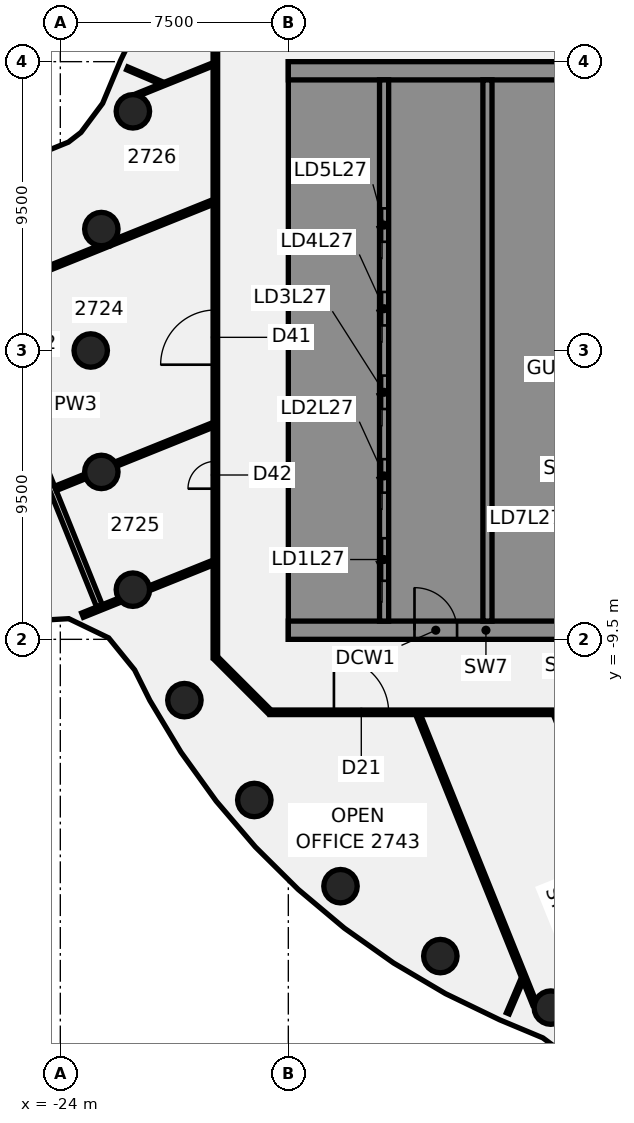
"""IFC4 building model, lengths in metres.
Left out: names, types, materials, properties, quantities, classifications, styles, units other than length and angle.
Written with IfcOpenShell. Run it as: python <this file> out.ifc"""

import sys

from ifc_helpers import new_model, si_unit, direction, frame, frame_2d, origin, origin_2d, place, context, subcontext, project, spatial, polyline, rectangle, circle, outline, extrude, element, fill, save


model = new_model("IFC4")
c1 = context("Model", 3, precision=1e-05, world=origin(), true_north=direction((0.0, 1.0)))
c2 = subcontext(c1, "Body", "Model", "MODEL_VIEW")
j1 = project(units=[si_unit("LENGTHUNIT", "METRE"), si_unit("PLANEANGLEUNIT", "RADIAN")], contexts=[c1])
p1 = place(None, origin())
s1 = spatial("IfcSite", under=j1, at=p1, CompositionType="ELEMENT")
p2 = place(p1, origin())
s2 = spatial("IfcBuilding", under=s1, at=p2, CompositionType="ELEMENT")
p3 = place(p2, frame((0.0, 0.0, 113.5)))
s3 = spatial("IfcBuildingStorey", under=s2, at=p3, CompositionType="ELEMENT", Elevation=113.5)
for number, where, z_axis, x_axis in (
    (1, (-21.613, 7.866, -0.14), (0.0, 0.0, 1.0), (1.0, 0.0, 0.0)),
    (2, (-22.651, 3.994, -0.14), (0.0, 0.0, 1.0), (1.0, 0.0, 0.0)),
    (3, (-23.0, 0.0, -0.14), (0.0, 0.0, 1.0), (1.0, 0.0, 0.0)),
    (4, (-22.651, -3.994, -0.14), (0.0, 0.0, 1.0), (1.0, 0.0, 0.0)),
    (5, (-21.613, -7.866, -0.14), (0.0, 0.0, 1.0), (1.0, 0.0, 0.0)),
    (6, (-19.919, -11.5, -0.14), (0.0, 0.0, 1.0), (1.0, 0.0, 0.0)),
    (7, (-17.619, -14.784, -0.14), (0.0, 0.0, 1.0), (1.0, 0.0, 0.0)),
    (8, (-14.784, -17.619, -0.14), (0.0, 0.0, 1.0), (1.0, 0.0, 0.0)),
    (9, (-11.5, -19.919, -0.14), (0.0, 0.0, 1.0), (1.0, 0.0, 0.0)),
    (10, (-7.866, -21.613, -0.14), (0.0, 0.0, 1.0), (1.0, 0.0, 0.0)),
):
    element("IfcColumn", number, at=place(p3, frame(where, z_axis=z_axis, x_axis=x_axis)), inside=s3, PredefinedType="COLUMN", context=c2, shape_type="SweptSolid", body=[
        extrude(circle(Radius=0.55, at=origin_2d()), origin(), (0.0, 0.0, 1.0), 3.75),
    ])
p4 = place(p3, frame((-28.028, 4.794, 0.0), z_axis=(0.0, 0.0, 1.0), x_axis=(0.373618022446, -0.927582650389, 0.0)))
e11 = element("IfcWall", 11, at=p4, inside=s3, PredefinedType="PARTITIONING", context=c2, shape_type="SweptSolid", body=[
    extrude(rectangle(XDim=14.224, YDim=0.2, at=frame_2d((7.112, 0.0))), origin(), (0.0, 0.0, 1.0), 3.01),
])
p5 = place(p4, frame((6.099, 0.0, 0.0)))
e12 = element("IfcOpeningElement", 12, at=p5, cuts=e11, PredefinedType="OPENING", context=c2, shape_type="SweptSolid", body=[
    extrude(rectangle(XDim=1.4, YDim=2.1, at=frame_2d((0.7, 1.05))), frame((0.0, 0.11, 0.0), z_axis=(0.0, -1.0, 0.0), x_axis=(1.0, 0.0, 0.0)), (0.0, 0.0, 1.0), 0.22),
])
p6 = place(p3, frame((-12.229, -11.983, 0.0), z_axis=(0.0, 0.0, 1.0), x_axis=(0.373679389849, -0.927557930052, 0.0)))
e13 = element("IfcWall", 13, at=p6, inside=s3, PredefinedType="PARTITIONING", context=c2, shape_type="SweptSolid", body=[
    extrude(rectangle(XDim=10.258, YDim=0.15, at=frame_2d((5.129, 0.0))), origin(), (0.0, 0.0, 1.0), 3.01),
])
p7 = place(p3, frame((-7.7, -11.983, 0.0), z_axis=(0.0, 0.0, 1.0), x_axis=(0.373640057319, -0.92757377473, 0.0)))
e14 = element("IfcWall", 14, at=p7, inside=s3, PredefinedType="PARTITIONING", context=c2, shape_type="SweptSolid", body=[
    extrude(rectangle(XDim=11.185, YDim=0.15, at=frame_2d((5.593, 0.0))), origin(), (0.0, 0.0, 1.0), 3.01),
])
p8 = place(p7, frame((3.66, 0.0, 0.0)))
e15 = element("IfcOpeningElement", 15, at=p8, cuts=e14, PredefinedType="OPENING", context=c2, shape_type="SweptSolid", body=[
    extrude(rectangle(XDim=0.9, YDim=2.1, at=frame_2d((0.45, 1.05))), frame((0.0, 0.085, 0.0), z_axis=(0.0, -1.0, 0.0), x_axis=(1.0, 0.0, 0.0)), (0.0, 0.0, 1.0), 0.17),
])
p9 = place(p3, frame((-18.872, -10.128, 0.0), z_axis=(0.0, 0.0, 1.0), x_axis=(0.707106781187, -0.707106781187, 0.0)))
e16 = element("IfcWall", 16, at=p9, inside=s3, PredefinedType="PARTITIONING", context=c2, shape_type="SweptSolid", body=[
    extrude(rectangle(XDim=2.465, YDim=0.15, at=frame_2d((1.232, 0.0))), origin(), (0.0, 0.0, 1.0), 3.01),
])
p10 = place(p3, frame((-21.8, 9.281, 0.0), z_axis=(0.0, 0.0, 1.0), x_axis=(0.919919713951, -0.392106771025, 0.0)))
e17 = element("IfcWall", 17, at=p10, inside=s3, PredefinedType="PARTITIONING", context=c2, shape_type="SweptSolid", body=[
    extrude(rectangle(XDim=1.22, YDim=0.1, at=frame_2d((0.61, 0.0))), origin(), (0.0, 0.0, 1.0), 3.01),
])
p11 = place(p3, frame((-17.1, -11.9, 0.0), z_axis=(0.0, 0.0, 1.0), x_axis=(1.0, 0.0, 0.0)))
e18 = element("IfcWall", 18, at=p11, inside=s3, PredefinedType="PARTITIONING", context=c2, shape_type="SweptSolid", body=[
    extrude(rectangle(XDim=34.165, YDim=0.15, at=frame_2d((17.083, 0.0))), origin(), (0.0, 0.0, 1.0), 3.01),
])
p12 = place(p11, frame((12.066, 0.0, 0.0)))
e19 = element("IfcOpeningElement", 19, at=p12, cuts=e18, PredefinedType="OPENING", context=c2, shape_type="SweptSolid", body=[
    extrude(rectangle(XDim=1.8, YDim=2.1, at=frame_2d((0.9, 1.05))), frame((0.0, 0.085, 0.0), z_axis=(0.0, -1.0, 0.0), x_axis=(1.0, 0.0, 0.0)), (0.0, 0.0, 1.0), 0.17),
])
p13 = place(p11, frame((2.1, 0.0, 0.0)))
e20 = element("IfcOpeningElement", 20, at=p13, cuts=e18, PredefinedType="OPENING", context=c2, shape_type="SweptSolid", body=[
    extrude(rectangle(XDim=1.8, YDim=2.1, at=frame_2d((0.9, 1.05))), frame((0.0, 0.085, 0.0), z_axis=(0.0, -1.0, 0.0), x_axis=(1.0, 0.0, 0.0)), (0.0, 0.0, 1.0), 0.17),
])
p14 = place(p11, frame((26.775, 0.0, 0.0)))
e21 = element("IfcOpeningElement", 21, at=p14, cuts=e18, PredefinedType="OPENING", context=c2, shape_type="SweptSolid", body=[
    extrude(rectangle(XDim=1.8, YDim=2.1, at=frame_2d((0.9, 1.05))), frame((0.0, 0.085, 0.0), z_axis=(0.0, -1.0, 0.0), x_axis=(1.0, 0.0, 0.0)), (0.0, 0.0, 1.0), 0.17),
])
p15 = place(p3, frame((-26.702, 1.771, 0.0), z_axis=(0.0, 0.0, 1.0), x_axis=(0.92759802507, 0.373579849412, 0.0)))
e22 = element("IfcWall", 22, at=p15, inside=s3, PredefinedType="PARTITIONING", context=c2, shape_type="SweptSolid", body=[
    extrude(rectangle(XDim=4.613, YDim=0.15, at=frame_2d((2.306, 0.0))), origin(), (0.0, 0.0, 1.0), 3.01),
])
p16 = place(p15, frame((1.25, 0.0, 0.0)))
e23 = element("IfcOpeningElement", 23, at=p16, cuts=e22, PredefinedType="OPENING", context=c2, shape_type="SweptSolid", body=[
    extrude(rectangle(XDim=0.9, YDim=2.1, at=frame_2d((0.45, 1.05))), frame((0.0, 0.085, 0.0), z_axis=(0.0, -1.0, 0.0), x_axis=(1.0, 0.0, 0.0)), (0.0, 0.0, 1.0), 0.17),
])
p17 = place(p3, frame((-22.359, 3.521, 0.0), z_axis=(0.0, 0.0, 1.0), x_axis=(0.927594907251, 0.373587590855, 0.0)))
e24 = element("IfcWall", 24, at=p17, inside=s3, PredefinedType="PARTITIONING", context=c2, shape_type="SweptSolid", body=[
    extrude(rectangle(XDim=3.639, YDim=0.15, at=frame_2d((1.819, 0.0))), origin(), (0.0, 0.0, 1.0), 3.01),
])
p18 = place(p3, frame((-24.161, -4.537, 0.0), z_axis=(0.0, 0.0, 1.0), x_axis=(0.927557987073, 0.37367924831, 0.0)))
e25 = element("IfcWall", 25, at=p18, inside=s3, PredefinedType="PARTITIONING", context=c2, shape_type="SweptSolid", body=[
    extrude(rectangle(XDim=1.066, YDim=0.15, at=frame_2d((0.533, 0.0))), origin(), (0.0, 0.0, 1.0), 3.01),
])
p19 = place(p3, frame((-22.161, -3.731, 0.0), z_axis=(0.0, 0.0, 1.0), x_axis=(0.927574565159, 0.373638095047, 0.0)))
e26 = element("IfcWall", 26, at=p19, inside=s3, PredefinedType="PARTITIONING", context=c2, shape_type="SweptSolid", body=[
    extrude(rectangle(XDim=3.426, YDim=0.15, at=frame_2d((1.713, 0.0))), origin(), (0.0, 0.0, 1.0), 3.01),
])
p20 = place(p3, frame((-23.27, -8.705, 0.0), z_axis=(0.0, 0.0, 1.0), x_axis=(0.927549297967, 0.37370081595, 0.0)))
e27 = element("IfcWall", 27, at=p20, inside=s3, PredefinedType="PARTITIONING", context=c2, shape_type="SweptSolid", body=[
    extrude(rectangle(XDim=1.33, YDim=0.15, at=frame_2d((0.665, 0.0))), origin(), (0.0, 0.0, 1.0), 3.01),
])
p21 = place(p3, frame((-21.066, -7.817, 0.0), z_axis=(0.0, 0.0, 1.0), x_axis=(0.92758920546, 0.373601747739, 0.0)))
e28 = element("IfcWall", 28, at=p21, inside=s3, PredefinedType="PARTITIONING", context=c2, shape_type="SweptSolid", body=[
    extrude(rectangle(XDim=2.245, YDim=0.15, at=frame_2d((1.123, 0.0))), origin(), (0.0, 0.0, 1.0), 3.01),
])
p22 = place(p3, frame((-21.498, 8.396, 0.0), z_axis=(0.0, 0.0, 1.0), x_axis=(0.927570424406, 0.373648374502, 0.0)))
e29 = element("IfcWall", 29, at=p22, inside=s3, PredefinedType="PARTITIONING", context=c2, shape_type="SweptSolid", body=[
    extrude(rectangle(XDim=2.721, YDim=0.1, at=frame_2d((1.36, 0.0))), origin(), (0.0, 0.0, 1.0), 3.01),
])
p23 = place(p3, frame((-9.281, -21.8, 0.0), z_axis=(0.0, 0.0, 1.0), x_axis=(0.392152757944, 0.919900111119, 0.0)))
e30 = element("IfcWall", 30, at=p23, inside=s3, PredefinedType="PARTITIONING", context=c2, shape_type="SweptSolid", body=[
    extrude(rectangle(XDim=1.185, YDim=0.1, at=frame_2d((0.592, 0.0))), origin(), (0.0, 0.0, 1.0), 3.01),
])
p24 = place(p3, frame((-18.9, -10.1, 0.0), z_axis=(0.0, 0.0, 1.0), x_axis=(0.0, 1.0, 0.0)))
e31 = element("IfcWall", 31, at=p24, inside=s3, PredefinedType="PARTITIONING", context=c2, shape_type="SweptSolid", body=[
    extrude(rectangle(XDim=20.2, YDim=0.15, at=frame_2d((10.1, 0.0))), origin(), (0.0, 0.0, 1.0), 3.01),
])
p25 = place(p24, frame((9.633, 0.0, 0.0)))
e32 = element("IfcOpeningElement", 32, at=p25, cuts=e31, PredefinedType="OPENING", context=c2, shape_type="SweptSolid", body=[
    extrude(rectangle(XDim=1.8, YDim=2.1, at=frame_2d((0.9, 1.05))), frame((0.0, 0.085, 0.0), z_axis=(0.0, -1.0, 0.0), x_axis=(1.0, 0.0, 0.0)), (0.0, 0.0, 1.0), 0.17),
])
p26 = place(p24, frame((5.555, 0.0, 0.0)))
e33 = element("IfcOpeningElement", 33, at=p26, cuts=e31, PredefinedType="OPENING", context=c2, shape_type="SweptSolid", body=[
    extrude(rectangle(XDim=0.9, YDim=2.1, at=frame_2d((0.45, 1.05))), frame((0.0, 0.085, 0.0), z_axis=(0.0, -1.0, 0.0), x_axis=(1.0, 0.0, 0.0)), (0.0, 0.0, 1.0), 0.17),
])
p27 = place(p3, frame((-16.5, -9.2, 0.0), z_axis=(0.0, 0.0, 1.0), x_axis=(1.0, 0.0, 0.0)))
e34 = element("IfcWall", 34, at=p27, inside=s3, PredefinedType="SHEAR", context=c2, shape_type="SweptSolid", body=[
    extrude(rectangle(XDim=13.0, YDim=0.6, at=frame_2d((6.5, 0.0))), origin(), (0.0, 0.0, 1.0), 3.61),
])
p28 = place(p27, frame((4.15, 0.0, 0.0)))
e35 = element("IfcOpeningElement", 35, at=p28, cuts=e34, PredefinedType="OPENING", context=c2, shape_type="SweptSolid", body=[
    extrude(rectangle(XDim=1.4, YDim=2.1, at=frame_2d((0.7, 1.05))), frame((0.0, 0.31, 0.0), z_axis=(0.0, -1.0, 0.0), x_axis=(1.0, 0.0, 0.0)), (0.0, 0.0, 1.0), 0.62),
])
p29 = place(p27, frame((10.125, 0.0, 0.0)))
e36 = element("IfcOpeningElement", 36, at=p29, cuts=e34, PredefinedType="OPENING", context=c2, shape_type="SweptSolid", body=[
    extrude(rectangle(XDim=1.4, YDim=2.1, at=frame_2d((0.7, 1.05))), frame((0.0, 0.31, 0.0), z_axis=(0.0, -1.0, 0.0), x_axis=(1.0, 0.0, 0.0)), (0.0, 0.0, 1.0), 0.62),
])
p30 = place(p3, origin())
e37 = element("IfcWall", 37, at=p30, inside=s3, PredefinedType="SHEAR", context=c2, shape_type="SweptSolid", body=[
    extrude(outline(polyline([(-13.5, -8.9), (-13.5, -8.125), (-15.9, -8.125), (-15.9, -5.625), (-13.5, -5.625), (-13.5, -5.375), (-15.9, -5.375), (-15.9, -2.875), (-13.5, -2.875), (-13.5, -2.625), (-15.9, -2.625), (-15.9, -0.125), (-13.5, -0.125), (-13.5, 0.125), (-15.9, 0.125), (-15.9, 2.625), (-13.5, 2.625), (-13.5, 2.875), (-15.9, 2.875), (-15.9, 5.375), (-13.5, 5.375), (-13.5, 5.625), (-15.9, 5.625), (-15.9, 8.125), (-13.5, 8.125), (-13.5, 8.9), (-15.9, 8.9), (-16.5, 8.9), (-16.5, -8.9), (-15.9, -8.9), (-13.5, -8.9)])), origin(), (0.0, 0.0, 1.0), 3.61),
])
p31 = place(p3, frame((-16.5, 9.2, 0.0), z_axis=(0.0, 0.0, 1.0), x_axis=(1.0, 0.0, 0.0)))
e38 = element("IfcWall", 38, at=p31, inside=s3, PredefinedType="SHEAR", context=c2, shape_type="SweptSolid", body=[
    extrude(rectangle(XDim=13.0, YDim=0.6, at=frame_2d((6.5, 0.0))), origin(), (0.0, 0.0, 1.0), 3.61),
])
p32 = place(p3, origin())
e39 = element("IfcWall", 39, at=p32, inside=s3, PredefinedType="SHEAR", context=c2, shape_type="SweptSolid", body=[
    extrude(outline(polyline([(-9.8, -5.375), (-9.8, -5.625), (-7.5, -5.625), (-7.2, -5.625), (-7.2, 8.9), (-7.5, 8.9), (-9.8, 8.9), (-9.8, 8.125), (-7.5, 8.125), (-7.5, 5.625), (-9.8, 5.625), (-9.8, 5.375), (-7.5, 5.375), (-7.5, 2.875), (-9.8, 2.875), (-9.8, 2.625), (-7.5, 2.625), (-7.5, 0.125), (-9.8, 0.125), (-9.8, -0.125), (-7.5, -0.125), (-7.5, -2.625), (-9.8, -2.625), (-9.8, -2.875), (-7.5, -2.875), (-7.5, -5.375), (-9.8, -5.375)])), origin(), (0.0, 0.0, 1.0), 3.61),
])
p33 = place(p3, origin())
e40 = element("IfcWall", 40, at=p33, inside=s3, PredefinedType="SHEAR", context=c2, shape_type="SweptSolid", body=[
    extrude(outline(polyline([(-7.5, -8.125), (-9.55, -8.125), (-9.55, -5.625), (-9.8, -5.625), (-9.8, -8.125), (-9.8, -8.9), (-7.5, -8.9), (-7.5, -8.125)])), origin(), (0.0, 0.0, 1.0), 3.61),
])
p34 = place(p3, frame((-13.35, -8.9, 0.0), z_axis=(0.0, 0.0, 1.0), x_axis=(0.0, 1.0, 0.0)))
e41 = element("IfcWall", 41, at=p34, inside=s3, PredefinedType="SHEAR", context=c2, shape_type="SweptSolid", body=[
    extrude(rectangle(XDim=17.8, YDim=0.3, at=frame_2d((8.9, 0.0))), origin(), (0.0, 0.0, 1.0), 3.61),
])
p35 = place(p34, frame((1.325, 0.0, 0.0)))
e42 = element("IfcOpeningElement", 42, at=p35, cuts=e41, PredefinedType="OPENING", context=c2, shape_type="SweptSolid", body=[
    extrude(rectangle(XDim=1.4, YDim=2.1, at=frame_2d((0.7, 1.05))), frame((0.0, 0.16, 0.0), z_axis=(0.0, -1.0, 0.0), x_axis=(1.0, 0.0, 0.0)), (0.0, 0.0, 1.0), 0.32),
])
p36 = place(p34, frame((4.225, 0.0, 0.0)))
e43 = element("IfcOpeningElement", 43, at=p36, cuts=e41, PredefinedType="OPENING", context=c2, shape_type="SweptSolid", body=[
    extrude(rectangle(XDim=1.1, YDim=2.1, at=frame_2d((0.55, 1.05))), frame((0.0, 0.16, 0.0), z_axis=(0.0, -1.0, 0.0), x_axis=(1.0, 0.0, 0.0)), (0.0, 0.0, 1.0), 0.32),
])
p37 = place(p34, frame((6.975, 0.0, 0.0)))
e44 = element("IfcOpeningElement", 44, at=p37, cuts=e41, PredefinedType="OPENING", context=c2, shape_type="SweptSolid", body=[
    extrude(rectangle(XDim=1.1, YDim=2.1, at=frame_2d((0.55, 1.05))), frame((0.0, 0.16, 0.0), z_axis=(0.0, -1.0, 0.0), x_axis=(1.0, 0.0, 0.0)), (0.0, 0.0, 1.0), 0.32),
])
p38 = place(p34, frame((9.725, 0.0, 0.0)))
e45 = element("IfcOpeningElement", 45, at=p38, cuts=e41, PredefinedType="OPENING", context=c2, shape_type="SweptSolid", body=[
    extrude(rectangle(XDim=1.1, YDim=2.1, at=frame_2d((0.55, 1.05))), frame((0.0, 0.16, 0.0), z_axis=(0.0, -1.0, 0.0), x_axis=(1.0, 0.0, 0.0)), (0.0, 0.0, 1.0), 0.32),
])
p39 = place(p34, frame((12.475, 0.0, 0.0)))
e46 = element("IfcOpeningElement", 46, at=p39, cuts=e41, PredefinedType="OPENING", context=c2, shape_type="SweptSolid", body=[
    extrude(rectangle(XDim=1.1, YDim=2.1, at=frame_2d((0.55, 1.05))), frame((0.0, 0.16, 0.0), z_axis=(0.0, -1.0, 0.0), x_axis=(1.0, 0.0, 0.0)), (0.0, 0.0, 1.0), 0.32),
])
p40 = place(p3, frame((-9.95, -8.9, 0.0), z_axis=(0.0, 0.0, 1.0), x_axis=(0.0, 1.0, 0.0)))
e47 = element("IfcWall", 47, at=p40, inside=s3, PredefinedType="SHEAR", context=c2, shape_type="SweptSolid", body=[
    extrude(rectangle(XDim=17.8, YDim=0.3, at=frame_2d((8.9, 0.0))), origin(), (0.0, 0.0, 1.0), 3.61),
])
p41 = place(p13, frame((1.8, 0.0, 0.0), z_axis=(0.0, 0.0, 1.0), x_axis=(-1.0, 0.0, 0.0)))
e48 = element("IfcDoor", 48, at=p41, inside=s3, OperationType="DOUBLE_DOOR_SINGLE_SWING", PredefinedType="DOOR", context=c2, shape_type="SweptSolid", body=[
    extrude(rectangle(XDim=1.8, YDim=2.1, at=frame_2d((0.9, 1.05))), frame((0.0, 0.025, 0.0), z_axis=(0.0, -1.0, 0.0), x_axis=(1.0, 0.0, 0.0)), (0.0, 0.0, 1.0), 0.05),
])
fill(e20, e48)
p42 = place(p25, frame((1.8, 0.0, 0.0), z_axis=(0.0, 0.0, 1.0), x_axis=(-1.0, 0.0, 0.0)))
e49 = element("IfcDoor", 49, at=p42, inside=s3, OperationType="DOUBLE_DOOR_SINGLE_SWING", PredefinedType="DOOR", context=c2, shape_type="SweptSolid", body=[
    extrude(rectangle(XDim=1.8, YDim=2.1, at=frame_2d((0.9, 1.05))), frame((0.0, 0.025, 0.0), z_axis=(0.0, -1.0, 0.0), x_axis=(1.0, 0.0, 0.0)), (0.0, 0.0, 1.0), 0.05),
])
fill(e32, e49)
p43 = place(p26, origin())
e50 = element("IfcDoor", 50, at=p43, inside=s3, OperationType="SINGLE_SWING_RIGHT", PredefinedType="DOOR", context=c2, shape_type="SweptSolid", body=[
    extrude(rectangle(XDim=0.9, YDim=2.1, at=frame_2d((0.45, 1.05))), frame((0.0, 0.025, 0.0), z_axis=(0.0, -1.0, 0.0), x_axis=(1.0, 0.0, 0.0)), (0.0, 0.0, 1.0), 0.05),
])
fill(e33, e50)
p44 = place(p28, origin())
e51 = element("IfcDoor", 51, at=p44, inside=s3, OperationType="SINGLE_SWING_LEFT", PredefinedType="DOOR", context=c2, shape_type="SweptSolid", body=[
    extrude(rectangle(XDim=1.4, YDim=2.1, at=frame_2d((0.7, 1.05))), frame((0.0, 0.025, 0.0), z_axis=(0.0, -1.0, 0.0), x_axis=(1.0, 0.0, 0.0)), (0.0, 0.0, 1.0), 0.05),
])
fill(e35, e51)
p45 = place(p35, origin())
e52 = element("IfcDoor", 52, at=p45, inside=s3, OperationType="SLIDING_TO_LEFT", PredefinedType="DOOR", context=c2, shape_type="SweptSolid", body=[
    extrude(rectangle(XDim=1.4, YDim=2.1, at=frame_2d((0.7, 1.05))), frame((0.0, 0.025, 0.0), z_axis=(0.0, -1.0, 0.0), x_axis=(1.0, 0.0, 0.0)), (0.0, 0.0, 1.0), 0.05),
])
fill(e42, e52)
p46 = place(p36, origin())
e53 = element("IfcDoor", 53, at=p46, inside=s3, OperationType="SLIDING_TO_LEFT", PredefinedType="DOOR", context=c2, shape_type="SweptSolid", body=[
    extrude(rectangle(XDim=1.1, YDim=2.1, at=frame_2d((0.55, 1.05))), frame((0.0, 0.025, 0.0), z_axis=(0.0, -1.0, 0.0), x_axis=(1.0, 0.0, 0.0)), (0.0, 0.0, 1.0), 0.05),
])
fill(e43, e53)
p47 = place(p37, origin())
e54 = element("IfcDoor", 54, at=p47, inside=s3, OperationType="SLIDING_TO_LEFT", PredefinedType="DOOR", context=c2, shape_type="SweptSolid", body=[
    extrude(rectangle(XDim=1.1, YDim=2.1, at=frame_2d((0.55, 1.05))), frame((0.0, 0.025, 0.0), z_axis=(0.0, -1.0, 0.0), x_axis=(1.0, 0.0, 0.0)), (0.0, 0.0, 1.0), 0.05),
])
fill(e44, e54)
p48 = place(p38, origin())
e55 = element("IfcDoor", 55, at=p48, inside=s3, OperationType="SLIDING_TO_LEFT", PredefinedType="DOOR", context=c2, shape_type="SweptSolid", body=[
    extrude(rectangle(XDim=1.1, YDim=2.1, at=frame_2d((0.55, 1.05))), frame((0.0, 0.025, 0.0), z_axis=(0.0, -1.0, 0.0), x_axis=(1.0, 0.0, 0.0)), (0.0, 0.0, 1.0), 0.05),
])
fill(e45, e55)
p49 = place(p39, origin())
e56 = element("IfcDoor", 56, at=p49, inside=s3, OperationType="SLIDING_TO_LEFT", PredefinedType="DOOR", context=c2, shape_type="SweptSolid", body=[
    extrude(rectangle(XDim=1.1, YDim=2.1, at=frame_2d((0.55, 1.05))), frame((0.0, 0.025, 0.0), z_axis=(0.0, -1.0, 0.0), x_axis=(1.0, 0.0, 0.0)), (0.0, 0.0, 1.0), 0.05),
])
fill(e46, e56)
save(model, sys.argv[1])
